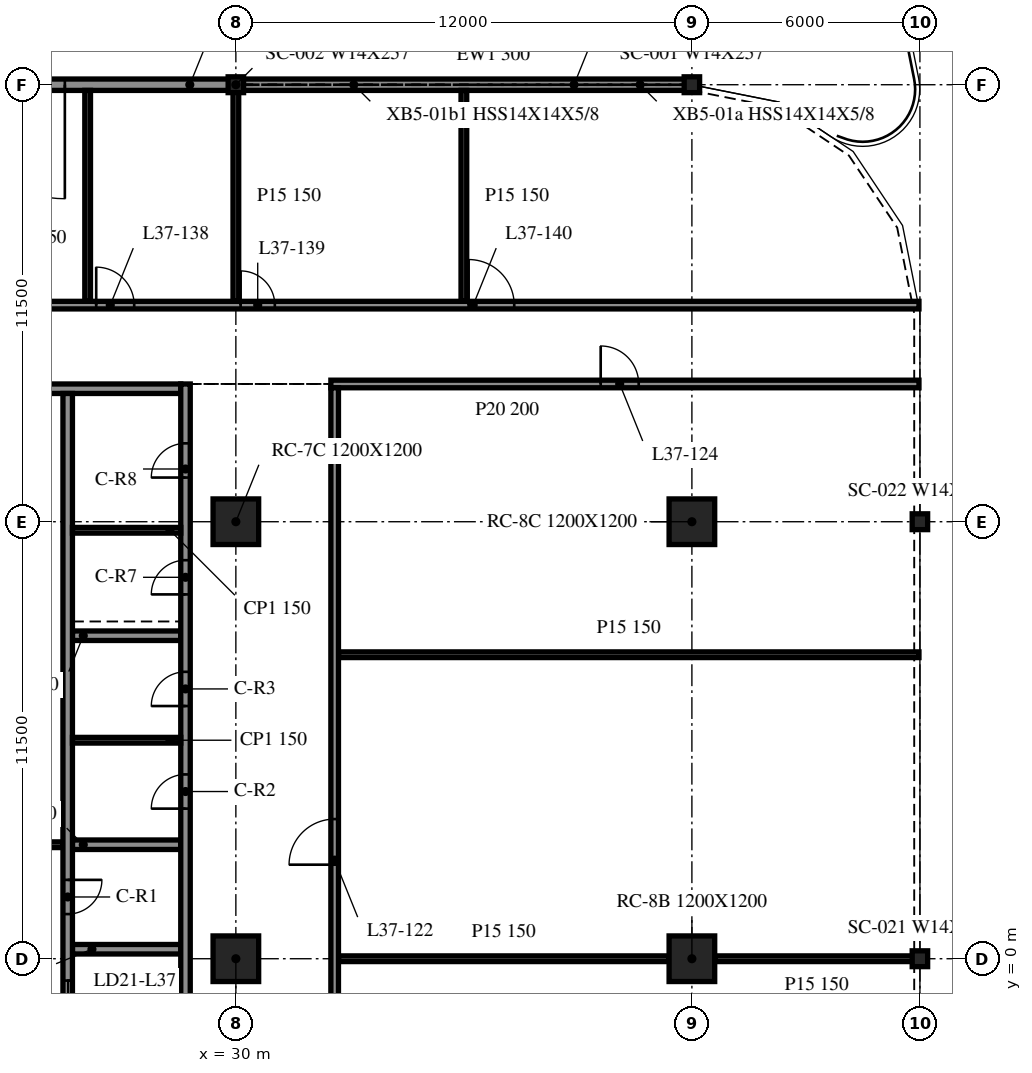
"""IFC4 building model, lengths in metres.
Left out: names, types, materials, properties, quantities, classifications, styles, units other than length and angle.
Written with IfcOpenShell. Run it as: python <this file> out.ifc"""

import sys

from ifc_helpers import new_model, si_unit, direction, frame, frame_2d, origin, origin_2d, place, context, subcontext, project, spatial, rectangle, i_section, extrude, element, fill, save


model = new_model("IFC4")
c1 = context("Model", 3, precision=1e-05, world=origin(), true_north=direction((0.0, 1.0)))
c2 = subcontext(c1, "Body", "Model", "MODEL_VIEW")
j1 = project(units=[si_unit("LENGTHUNIT", "METRE"), si_unit("PLANEANGLEUNIT", "RADIAN")], contexts=[c1])
p1 = place(None, origin())
s1 = spatial("IfcSite", under=j1, at=p1, CompositionType="ELEMENT")
p2 = place(p1, origin())
s2 = spatial("IfcBuilding", under=s1, at=p2, CompositionType="ELEMENT")
p3 = place(p2, frame((0.0, 0.0, 159.2)))
s3 = spatial("IfcBuildingStorey", under=s2, at=p3, CompositionType="ELEMENT", Elevation=159.2)
for number, where, z_axis, x_axis in (
    (1, (30.0, 0.0, -0.34), (0.0, 0.0, 1.0), (1.0, 0.0, 0.0)),
    (2, (30.0, 11.5, -0.34), (0.0, 0.0, 1.0), (1.0, 0.0, 0.0)),
    (3, (42.0, 0.0, -0.34), (0.0, 0.0, 1.0), (1.0, 0.0, 0.0)),
    (4, (42.0, 11.5, -0.34), (0.0, 0.0, 1.0), (1.0, 0.0, 0.0)),
):
    element("IfcColumn", number, at=place(p3, frame(where, z_axis=z_axis, x_axis=x_axis)), inside=s3, PredefinedType="COLUMN", context=c2, shape_type="SweptSolid", body=[
        extrude(rectangle(XDim=1.2, YDim=1.2, at=origin_2d()), origin(), (0.0, 0.0, 1.0), 3.8),
    ])
for number, where, z_axis, x_axis in (
    (5, (42.0, 23.0, -0.34), (0.0, 0.0, 1.0), (1.0, 0.0, 0.0)),
    (6, (30.0, 23.0, -0.34), (0.0, 0.0, 1.0), (1.0, 0.0, 0.0)),
    (7, (48.0, 0.0, -0.34), (0.0, 0.0, 1.0), (1.0, 0.0, 0.0)),
    (8, (48.0, 11.5, -0.34), (0.0, 0.0, 1.0), (1.0, 0.0, 0.0)),
):
    element("IfcColumn", number, at=place(p3, frame(where, z_axis=z_axis, x_axis=x_axis)), inside=s3, PredefinedType="COLUMN", context=c2, shape_type="SweptSolid", body=[
        extrude(i_section(OverallWidth=0.406, OverallDepth=0.417, WebThickness=0.03, FlangeThickness=0.048, at=origin_2d()), origin(), (0.0, 0.0, 1.0), 3.8),
    ])
p4 = place(p3, frame((41.985, 23.0, 0.0), z_axis=(0.0, 0.0, 1.0), x_axis=(-1.0, 0.0, 0.0)))
e9 = element("IfcWall", 9, at=p4, inside=s3, PredefinedType="NOTDEFINED", context=c2, shape_type="SweptSolid", body=[
    extrude(rectangle(XDim=11.97, YDim=0.3, at=frame_2d((5.985, 0.0))), origin(), (0.0, 0.0, 1.0), 2.782),
])
p5 = place(p3, frame((29.985, 23.0, 0.0), z_axis=(0.0, 0.0, 1.0), x_axis=(-1.0, 0.0, 0.0)))
e10 = element("IfcWall", 10, at=p5, inside=s3, PredefinedType="NOTDEFINED", context=c2, shape_type="SweptSolid", body=[
    extrude(rectangle(XDim=11.97, YDim=0.3, at=frame_2d((5.985, 0.0))), origin(), (0.0, 0.0, 1.0), 2.782),
])
p6 = place(p5, frame((4.485, 0.0, 0.0)))
e11 = element("IfcOpeningElement", 11, at=p6, cuts=e10, PredefinedType="OPENING", context=c2, shape_type="SweptSolid", body=[
    extrude(rectangle(XDim=3.0, YDim=2.4, at=frame_2d((1.5, 1.2))), frame((0.0, 0.16, 0.0), z_axis=(0.0, -1.0, 0.0), x_axis=(1.0, 0.0, 0.0)), (0.0, 0.0, 1.0), 0.32),
])
p7 = place(p3, frame((28.675, -9.125, 0.0), z_axis=(0.0, 0.0, 1.0), x_axis=(0.0, 1.0, 0.0)))
e12 = element("IfcWall", 12, at=p7, inside=s3, PredefinedType="SOLIDWALL", context=c2, shape_type="SweptSolid", body=[
    extrude(rectangle(XDim=24.25, YDim=0.25, at=frame_2d((12.125, 0.0))), origin(), (0.0, 0.0, 1.0), 3.46),
])
p8 = place(p7, frame((13.075, 0.0, 0.0)))
e13 = element("IfcOpeningElement", 13, at=p8, cuts=e12, PredefinedType="OPENING", context=c2, shape_type="SweptSolid", body=[
    extrude(rectangle(XDim=0.9, YDim=2.1, at=frame_2d((0.45, 1.05))), frame((0.0, 0.135, 0.0), z_axis=(0.0, -1.0, 0.0), x_axis=(1.0, 0.0, 0.0)), (0.0, 0.0, 1.0), 0.27),
])
p9 = place(p7, frame((15.775, 0.0, 0.0)))
e14 = element("IfcOpeningElement", 14, at=p9, cuts=e12, PredefinedType="OPENING", context=c2, shape_type="SweptSolid", body=[
    extrude(rectangle(XDim=0.9, YDim=2.1, at=frame_2d((0.45, 1.05))), frame((0.0, 0.135, 0.0), z_axis=(0.0, -1.0, 0.0), x_axis=(1.0, 0.0, 0.0)), (0.0, 0.0, 1.0), 0.27),
])
p10 = place(p7, frame((18.712, 0.0, 0.0)))
e15 = element("IfcOpeningElement", 15, at=p10, cuts=e12, PredefinedType="OPENING", context=c2, shape_type="SweptSolid", body=[
    extrude(rectangle(XDim=0.9, YDim=2.1, at=frame_2d((0.45, 1.05))), frame((0.0, 0.135, 0.0), z_axis=(0.0, -1.0, 0.0), x_axis=(1.0, 0.0, 0.0)), (0.0, 0.0, 1.0), 0.27),
])
p11 = place(p7, frame((21.788, 0.0, 0.0)))
e16 = element("IfcOpeningElement", 16, at=p11, cuts=e12, PredefinedType="OPENING", context=c2, shape_type="SweptSolid", body=[
    extrude(rectangle(XDim=0.9, YDim=2.1, at=frame_2d((0.45, 1.05))), frame((0.0, 0.135, 0.0), z_axis=(0.0, -1.0, 0.0), x_axis=(1.0, 0.0, 0.0)), (0.0, 0.0, 1.0), 0.27),
])
p12 = place(p3, frame((19.45, 15.0, 0.0), z_axis=(0.0, 0.0, 1.0), x_axis=(1.0, 0.0, 0.0)))
e17 = element("IfcWall", 17, at=p12, inside=s3, PredefinedType="SOLIDWALL", context=c2, shape_type="SweptSolid", body=[
    extrude(rectangle(XDim=9.1, YDim=0.25, at=frame_2d((4.55, 0.0))), origin(), (0.0, 0.0, 1.0), 3.46),
])
p13 = place(p12, frame((3.65, 0.0, 0.0)))
e18 = element("IfcOpeningElement", 18, at=p13, cuts=e17, PredefinedType="OPENING", context=c2, shape_type="SweptSolid", body=[
    extrude(rectangle(XDim=1.8, YDim=2.1, at=frame_2d((0.9, 1.05))), frame((0.0, 0.135, 0.0), z_axis=(0.0, -1.0, 0.0), x_axis=(1.0, 0.0, 0.0)), (0.0, 0.0, 1.0), 0.27),
])
p14 = place(p3, frame((25.575, 14.875, 0.0), z_axis=(0.0, 0.0, 1.0), x_axis=(0.0, -1.0, 0.0)))
e19 = element("IfcWall", 19, at=p14, inside=s3, PredefinedType="SOLIDWALL", context=c2, shape_type="SweptSolid", body=[
    extrude(rectangle(XDim=17.5, YDim=0.25, at=frame_2d((8.75, 0.0))), origin(), (0.0, 0.0, 1.0), 3.46),
])
p15 = place(p14, frame((15.45, 0.0, 0.0)))
e20 = element("IfcOpeningElement", 20, at=p15, cuts=e19, PredefinedType="OPENING", context=c2, shape_type="SweptSolid", body=[
    extrude(rectangle(XDim=1.1, YDim=2.1, at=frame_2d((0.55, 1.05))), frame((0.0, 0.135, 0.0), z_axis=(0.0, -1.0, 0.0), x_axis=(1.0, 0.0, 0.0)), (0.0, 0.0, 1.0), 0.27),
])
p16 = place(p14, frame((12.8, 0.0, 0.0)))
e21 = element("IfcOpeningElement", 21, at=p16, cuts=e19, PredefinedType="OPENING", context=c2, shape_type="SweptSolid", body=[
    extrude(rectangle(XDim=0.9, YDim=2.1, at=frame_2d((0.45, 1.05))), frame((0.0, 0.135, 0.0), z_axis=(0.0, -1.0, 0.0), x_axis=(1.0, 0.0, 0.0)), (0.0, 0.0, 1.0), 0.27),
])
for number, where, z_axis, x_axis in (
    (22, (25.7, 0.25, 0.0), (0.0, 0.0, 1.0), (1.0, 0.0, 0.0)),
    (23, (25.7, 3.0, 0.0), (0.0, 0.0, 1.0), (1.0, 0.0, 0.0)),
    (24, (25.7, 8.5, 0.0), (0.0, 0.0, 1.0), (1.0, 0.0, 0.0)),
):
    element("IfcWall", number, at=place(p3, frame(where, z_axis=z_axis, x_axis=x_axis)), inside=s3, PredefinedType="SOLIDWALL", context=c2, shape_type="SweptSolid", body=[
        extrude(rectangle(XDim=2.85, YDim=0.25, at=frame_2d((1.425, 0.0))), origin(), (0.0, 0.0, 1.0), 3.46),
    ])
p17 = place(p3, frame((22.55, 3.0, 0.0), z_axis=(0.0, 0.0, 1.0), x_axis=(1.0, 0.0, 0.0)))
e25 = element("IfcWall", 25, at=p17, inside=s3, PredefinedType="PARTITIONING", context=c2, shape_type="SweptSolid", body=[
    extrude(rectangle(XDim=2.9, YDim=0.15, at=frame_2d((1.45, 0.0))), origin(), (0.0, 0.0, 1.0), 3.46),
])
for number, where, z_axis, x_axis in (
    (26, (25.7, 5.75, 0.0), (0.0, 0.0, 1.0), (1.0, 0.0, 0.0)),
    (27, (25.7, 11.275, 0.0), (0.0, 0.0, 1.0), (1.0, 0.0, 0.0)),
):
    element("IfcWall", number, at=place(p3, frame(where, z_axis=z_axis, x_axis=x_axis)), inside=s3, PredefinedType="PARTITIONING", context=c2, shape_type="SweptSolid", body=[
        extrude(rectangle(XDim=2.85, YDim=0.15, at=frame_2d((1.425, 0.0))), origin(), (0.0, 0.0, 1.0), 3.46),
    ])
p18 = place(p3, frame((32.7, 0.0, 0.0), z_axis=(0.0, 0.0, 1.0), x_axis=(1.0, 0.0, 0.0)))
e28 = element("IfcWall", 28, at=p18, inside=s3, PredefinedType="PARTITIONING", context=c2, shape_type="SweptSolid", body=[
    extrude(rectangle(XDim=8.7, YDim=0.15, at=frame_2d((4.35, 0.0))), origin(), (0.0, 0.0, 1.0), 3.46),
])
p19 = place(p3, frame((42.6, 0.0, 0.0), z_axis=(0.0, 0.0, 1.0), x_axis=(1.0, 0.0, 0.0)))
e29 = element("IfcWall", 29, at=p19, inside=s3, PredefinedType="PARTITIONING", context=c2, shape_type="SweptSolid", body=[
    extrude(rectangle(XDim=5.375, YDim=0.15, at=frame_2d((2.688, 0.0))), origin(), (0.0, 0.0, 1.0), 3.46),
])
p20 = place(p3, frame((32.7, 8.0, 0.0), z_axis=(0.0, 0.0, 1.0), x_axis=(1.0, 0.0, 0.0)))
e30 = element("IfcWall", 30, at=p20, inside=s3, PredefinedType="PARTITIONING", context=c2, shape_type="SweptSolid", body=[
    extrude(rectangle(XDim=15.275, YDim=0.15, at=frame_2d((7.638, 0.0))), origin(), (0.0, 0.0, 1.0), 3.46),
])
p21 = place(p3, frame((32.5, 15.125, 0.0), z_axis=(0.0, 0.0, 1.0), x_axis=(1.0, 0.0, 0.0)))
e31 = element("IfcWall", 31, at=p21, inside=s3, PredefinedType="PARTITIONING", context=c2, shape_type="SweptSolid", body=[
    extrude(rectangle(XDim=15.475, YDim=0.2, at=frame_2d((7.738, 0.0))), origin(), (0.0, 0.0, 1.0), 3.46),
])
p22 = place(p21, frame((7.1, 0.0, 0.0)))
e32 = element("IfcOpeningElement", 32, at=p22, cuts=e31, PredefinedType="OPENING", context=c2, shape_type="SweptSolid", body=[
    extrude(rectangle(XDim=1.0, YDim=2.1, at=frame_2d((0.5, 1.05))), frame((0.0, 0.11, 0.0), z_axis=(0.0, -1.0, 0.0), x_axis=(1.0, 0.0, 0.0)), (0.0, 0.0, 1.0), 0.22),
])
p23 = place(p3, frame((-47.975, 17.2, 0.0), z_axis=(0.0, 0.0, 1.0), x_axis=(1.0, 0.0, 0.0)))
e33 = element("IfcWall", 33, at=p23, inside=s3, PredefinedType="PARTITIONING", context=c2, shape_type="SweptSolid", body=[
    extrude(rectangle(XDim=95.95, YDim=0.2, at=frame_2d((47.975, 0.0))), origin(), (0.0, 0.0, 1.0), 3.46),
])
p24 = place(p23, frame((4.5, 0.0, 0.0)))
e34 = element("IfcOpeningElement", 34, at=p24, cuts=e33, PredefinedType="OPENING", context=c2, shape_type="SweptSolid", body=[
    extrude(rectangle(XDim=1.0, YDim=2.1, at=frame_2d((0.5, 1.05))), frame((0.0, 0.11, 0.0), z_axis=(0.0, -1.0, 0.0), x_axis=(1.0, 0.0, 0.0)), (0.0, 0.0, 1.0), 0.22),
])
p25 = place(p23, frame((10.5, 0.0, 0.0)))
e35 = element("IfcOpeningElement", 35, at=p25, cuts=e33, PredefinedType="OPENING", context=c2, shape_type="SweptSolid", body=[
    extrude(rectangle(XDim=1.0, YDim=2.1, at=frame_2d((0.5, 1.05))), frame((0.0, 0.11, 0.0), z_axis=(0.0, -1.0, 0.0), x_axis=(1.0, 0.0, 0.0)), (0.0, 0.0, 1.0), 0.22),
])
p26 = place(p23, frame((22.7, 0.0, 0.0)))
e36 = element("IfcOpeningElement", 36, at=p26, cuts=e33, PredefinedType="OPENING", context=c2, shape_type="SweptSolid", body=[
    extrude(rectangle(XDim=0.9, YDim=2.1, at=frame_2d((0.45, 1.05))), frame((0.0, 0.11, 0.0), z_axis=(0.0, -1.0, 0.0), x_axis=(1.0, 0.0, 0.0)), (0.0, 0.0, 1.0), 0.22),
])
p27 = place(p23, frame((25.7, 0.0, 0.0)))
e37 = element("IfcOpeningElement", 37, at=p27, cuts=e33, PredefinedType="OPENING", context=c2, shape_type="SweptSolid", body=[
    extrude(rectangle(XDim=1.2, YDim=2.1, at=frame_2d((0.6, 1.05))), frame((0.0, 0.11, 0.0), z_axis=(0.0, -1.0, 0.0), x_axis=(1.0, 0.0, 0.0)), (0.0, 0.0, 1.0), 0.22),
])
p28 = place(p23, frame((28.7, 0.0, 0.0)))
e38 = element("IfcOpeningElement", 38, at=p28, cuts=e33, PredefinedType="OPENING", context=c2, shape_type="SweptSolid", body=[
    extrude(rectangle(XDim=0.9, YDim=2.1, at=frame_2d((0.45, 1.05))), frame((0.0, 0.11, 0.0), z_axis=(0.0, -1.0, 0.0), x_axis=(1.0, 0.0, 0.0)), (0.0, 0.0, 1.0), 0.22),
])
p29 = place(p23, frame((36.7, 0.0, 0.0)))
e39 = element("IfcOpeningElement", 39, at=p29, cuts=e33, PredefinedType="OPENING", context=c2, shape_type="SweptSolid", body=[
    extrude(rectangle(XDim=1.0, YDim=2.1, at=frame_2d((0.5, 1.05))), frame((0.0, 0.11, 0.0), z_axis=(0.0, -1.0, 0.0), x_axis=(1.0, 0.0, 0.0)), (0.0, 0.0, 1.0), 0.22),
])
p30 = place(p23, frame((46.5, 0.0, 0.0)))
e40 = element("IfcOpeningElement", 40, at=p30, cuts=e33, PredefinedType="OPENING", context=c2, shape_type="SweptSolid", body=[
    extrude(rectangle(XDim=1.0, YDim=2.1, at=frame_2d((0.5, 1.05))), frame((0.0, 0.11, 0.0), z_axis=(0.0, -1.0, 0.0), x_axis=(1.0, 0.0, 0.0)), (0.0, 0.0, 1.0), 0.22),
])
p31 = place(p23, frame((48.1, 0.0, 0.0)))
e41 = element("IfcOpeningElement", 41, at=p31, cuts=e33, PredefinedType="OPENING", context=c2, shape_type="SweptSolid", body=[
    extrude(rectangle(XDim=0.9, YDim=2.1, at=frame_2d((0.45, 1.05))), frame((0.0, 0.11, 0.0), z_axis=(0.0, -1.0, 0.0), x_axis=(1.0, 0.0, 0.0)), (0.0, 0.0, 1.0), 0.22),
])
p32 = place(p23, frame((51.5, 0.0, 0.0)))
e42 = element("IfcOpeningElement", 42, at=p32, cuts=e33, PredefinedType="OPENING", context=c2, shape_type="SweptSolid", body=[
    extrude(rectangle(XDim=1.2, YDim=2.1, at=frame_2d((0.6, 1.05))), frame((0.0, 0.11, 0.0), z_axis=(0.0, -1.0, 0.0), x_axis=(1.0, 0.0, 0.0)), (0.0, 0.0, 1.0), 0.22),
])
p33 = place(p23, frame((54.1, 0.0, 0.0)))
e43 = element("IfcOpeningElement", 43, at=p33, cuts=e33, PredefinedType="OPENING", context=c2, shape_type="SweptSolid", body=[
    extrude(rectangle(XDim=0.9, YDim=2.1, at=frame_2d((0.45, 1.05))), frame((0.0, 0.11, 0.0), z_axis=(0.0, -1.0, 0.0), x_axis=(1.0, 0.0, 0.0)), (0.0, 0.0, 1.0), 0.22),
])
p34 = place(p23, frame((62.3, 0.0, 0.0)))
e44 = element("IfcOpeningElement", 44, at=p34, cuts=e33, PredefinedType="OPENING", context=c2, shape_type="SweptSolid", body=[
    extrude(rectangle(XDim=1.0, YDim=2.1, at=frame_2d((0.5, 1.05))), frame((0.0, 0.11, 0.0), z_axis=(0.0, -1.0, 0.0), x_axis=(1.0, 0.0, 0.0)), (0.0, 0.0, 1.0), 0.22),
])
p35 = place(p23, frame((74.3, 0.0, 0.0)))
e45 = element("IfcOpeningElement", 45, at=p35, cuts=e33, PredefinedType="OPENING", context=c2, shape_type="SweptSolid", body=[
    extrude(rectangle(XDim=1.0, YDim=2.1, at=frame_2d((0.5, 1.05))), frame((0.0, 0.11, 0.0), z_axis=(0.0, -1.0, 0.0), x_axis=(1.0, 0.0, 0.0)), (0.0, 0.0, 1.0), 0.22),
])
p36 = place(p23, frame((78.1, 0.0, 0.0)))
e46 = element("IfcOpeningElement", 46, at=p36, cuts=e33, PredefinedType="OPENING", context=c2, shape_type="SweptSolid", body=[
    extrude(rectangle(XDim=0.9, YDim=2.1, at=frame_2d((0.45, 1.05))), frame((0.0, 0.11, 0.0), z_axis=(0.0, -1.0, 0.0), x_axis=(1.0, 0.0, 0.0)), (0.0, 0.0, 1.0), 0.22),
])
p37 = place(p23, frame((84.1, 0.0, 0.0)))
e47 = element("IfcOpeningElement", 47, at=p37, cuts=e33, PredefinedType="OPENING", context=c2, shape_type="SweptSolid", body=[
    extrude(rectangle(XDim=1.2, YDim=2.1, at=frame_2d((0.6, 1.05))), frame((0.0, 0.11, 0.0), z_axis=(0.0, -1.0, 0.0), x_axis=(1.0, 0.0, 0.0)), (0.0, 0.0, 1.0), 0.22),
])
for number, where, z_axis, x_axis in (
    (48, (26.1, 17.3, 0.0), (0.0, 0.0, 1.0), (0.0, 1.0, 0.0)),
    (49, (30.0, 17.3, 0.0), (0.0, 0.0, 1.0), (0.0, 1.0, 0.0)),
):
    element("IfcWall", number, at=place(p3, frame(where, z_axis=z_axis, x_axis=x_axis)), inside=s3, PredefinedType="PARTITIONING", context=c2, shape_type="SweptSolid", body=[
        extrude(rectangle(XDim=5.55, YDim=0.15, at=frame_2d((2.775, 0.0))), origin(), (0.0, 0.0, 1.0), 3.46),
    ])
p38 = place(p3, frame((32.6, -9.025, 0.0), z_axis=(0.0, 0.0, 1.0), x_axis=(0.0, 1.0, 0.0)))
e50 = element("IfcWall", 50, at=p38, inside=s3, PredefinedType="PARTITIONING", context=c2, shape_type="SweptSolid", body=[
    extrude(rectangle(XDim=24.05, YDim=0.2, at=frame_2d((12.025, 0.0))), origin(), (0.0, 0.0, 1.0), 3.46),
])
p39 = place(p38, frame((11.5, 0.0, 0.0)))
e51 = element("IfcOpeningElement", 51, at=p39, cuts=e50, PredefinedType="OPENING", context=c2, shape_type="SweptSolid", body=[
    extrude(rectangle(XDim=1.2, YDim=2.1, at=frame_2d((0.6, 1.05))), frame((0.0, 0.11, 0.0), z_axis=(0.0, -1.0, 0.0), x_axis=(1.0, 0.0, 0.0)), (0.0, 0.0, 1.0), 0.22),
])
p40 = place(p3, frame((36.0, 17.3, 0.0), z_axis=(0.0, 0.0, 1.0), x_axis=(0.0, 1.0, 0.0)))
e52 = element("IfcWall", 52, at=p40, inside=s3, PredefinedType="PARTITIONING", context=c2, shape_type="SweptSolid", body=[
    extrude(rectangle(XDim=5.55, YDim=0.15, at=frame_2d((2.775, 0.0))), origin(), (0.0, 0.0, 1.0), 3.46),
])
p41 = place(p6, origin())
e53 = element("IfcDoor", 53, at=p41, inside=s3, OperationType="SINGLE_SWING_LEFT", PredefinedType="DOOR", context=c2, shape_type="SweptSolid", body=[
    extrude(rectangle(XDim=3.0, YDim=2.4, at=frame_2d((1.5, 1.2))), frame((0.0, 0.025, 0.0), z_axis=(0.0, -1.0, 0.0), x_axis=(1.0, 0.0, 0.0)), (0.0, 0.0, 1.0), 0.05),
])
fill(e11, e53)
p42 = place(p15, origin())
e54 = element("IfcDoor", 54, at=p42, inside=s3, OperationType="DOUBLE_DOOR_SLIDING", PredefinedType="DOOR", context=c2, shape_type="SweptSolid", body=[
    extrude(rectangle(XDim=1.1, YDim=2.1, at=frame_2d((0.55, 1.05))), frame((0.0, 0.025, 0.0), z_axis=(0.0, -1.0, 0.0), x_axis=(1.0, 0.0, 0.0)), (0.0, 0.0, 1.0), 0.05),
])
fill(e20, e54)
p43 = place(p16, origin())
e55 = element("IfcDoor", 55, at=p43, inside=s3, OperationType="SINGLE_SWING_LEFT", PredefinedType="DOOR", context=c2, shape_type="SweptSolid", body=[
    extrude(rectangle(XDim=0.9, YDim=2.1, at=frame_2d((0.45, 1.05))), frame((0.0, 0.025, 0.0), z_axis=(0.0, -1.0, 0.0), x_axis=(1.0, 0.0, 0.0)), (0.0, 0.0, 1.0), 0.05),
])
fill(e21, e55)
p44 = place(p8, origin())
e56 = element("IfcDoor", 56, at=p44, inside=s3, OperationType="SINGLE_SWING_RIGHT", PredefinedType="DOOR", context=c2, shape_type="SweptSolid", body=[
    extrude(rectangle(XDim=0.9, YDim=2.1, at=frame_2d((0.45, 1.05))), frame((0.0, 0.025, 0.0), z_axis=(0.0, -1.0, 0.0), x_axis=(1.0, 0.0, 0.0)), (0.0, 0.0, 1.0), 0.05),
])
fill(e13, e56)
p45 = place(p9, origin())
e57 = element("IfcDoor", 57, at=p45, inside=s3, OperationType="SINGLE_SWING_LEFT", PredefinedType="DOOR", context=c2, shape_type="SweptSolid", body=[
    extrude(rectangle(XDim=0.9, YDim=2.1, at=frame_2d((0.45, 1.05))), frame((0.0, 0.025, 0.0), z_axis=(0.0, -1.0, 0.0), x_axis=(1.0, 0.0, 0.0)), (0.0, 0.0, 1.0), 0.05),
])
fill(e14, e57)
p46 = place(p10, origin())
e58 = element("IfcDoor", 58, at=p46, inside=s3, OperationType="SINGLE_SWING_LEFT", PredefinedType="DOOR", context=c2, shape_type="SweptSolid", body=[
    extrude(rectangle(XDim=0.9, YDim=2.1, at=frame_2d((0.45, 1.05))), frame((0.0, 0.025, 0.0), z_axis=(0.0, -1.0, 0.0), x_axis=(1.0, 0.0, 0.0)), (0.0, 0.0, 1.0), 0.05),
])
fill(e15, e58)
p47 = place(p11, origin())
e59 = element("IfcDoor", 59, at=p47, inside=s3, OperationType="SINGLE_SWING_RIGHT", PredefinedType="DOOR", context=c2, shape_type="SweptSolid", body=[
    extrude(rectangle(XDim=0.9, YDim=2.1, at=frame_2d((0.45, 1.05))), frame((0.0, 0.025, 0.0), z_axis=(0.0, -1.0, 0.0), x_axis=(1.0, 0.0, 0.0)), (0.0, 0.0, 1.0), 0.05),
])
fill(e16, e59)
p48 = place(p39, origin())
e60 = element("IfcDoor", 60, at=p48, inside=s3, OperationType="SINGLE_SWING_LEFT", PredefinedType="DOOR", context=c2, shape_type="SweptSolid", body=[
    extrude(rectangle(XDim=1.2, YDim=2.1, at=frame_2d((0.6, 1.05))), frame((0.0, 0.025, 0.0), z_axis=(0.0, -1.0, 0.0), x_axis=(1.0, 0.0, 0.0)), (0.0, 0.0, 1.0), 0.05),
])
fill(e51, e60)
p49 = place(p22, origin())
e61 = element("IfcDoor", 61, at=p49, inside=s3, OperationType="SINGLE_SWING_RIGHT", PredefinedType="DOOR", context=c2, shape_type="SweptSolid", body=[
    extrude(rectangle(XDim=1.0, YDim=2.1, at=frame_2d((0.5, 1.05))), frame((0.0, 0.025, 0.0), z_axis=(0.0, -1.0, 0.0), x_axis=(1.0, 0.0, 0.0)), (0.0, 0.0, 1.0), 0.05),
])
fill(e32, e61)
p50 = place(p35, origin())
e62 = element("IfcDoor", 62, at=p50, inside=s3, OperationType="SINGLE_SWING_RIGHT", PredefinedType="DOOR", context=c2, shape_type="SweptSolid", body=[
    extrude(rectangle(XDim=1.0, YDim=2.1, at=frame_2d((0.5, 1.05))), frame((0.0, 0.025, 0.0), z_axis=(0.0, -1.0, 0.0), x_axis=(1.0, 0.0, 0.0)), (0.0, 0.0, 1.0), 0.05),
])
fill(e45, e62)
p51 = place(p36, origin())
e63 = element("IfcDoor", 63, at=p51, inside=s3, OperationType="SINGLE_SWING_RIGHT", PredefinedType="DOOR", context=c2, shape_type="SweptSolid", body=[
    extrude(rectangle(XDim=0.9, YDim=2.1, at=frame_2d((0.45, 1.05))), frame((0.0, 0.025, 0.0), z_axis=(0.0, -1.0, 0.0), x_axis=(1.0, 0.0, 0.0)), (0.0, 0.0, 1.0), 0.05),
])
fill(e46, e63)
p52 = place(p37, origin())
e64 = element("IfcDoor", 64, at=p52, inside=s3, OperationType="SINGLE_SWING_RIGHT", PredefinedType="DOOR", context=c2, shape_type="SweptSolid", body=[
    extrude(rectangle(XDim=1.2, YDim=2.1, at=frame_2d((0.6, 1.05))), frame((0.0, 0.025, 0.0), z_axis=(0.0, -1.0, 0.0), x_axis=(1.0, 0.0, 0.0)), (0.0, 0.0, 1.0), 0.05),
])
fill(e47, e64)
save(model, sys.argv[1])
